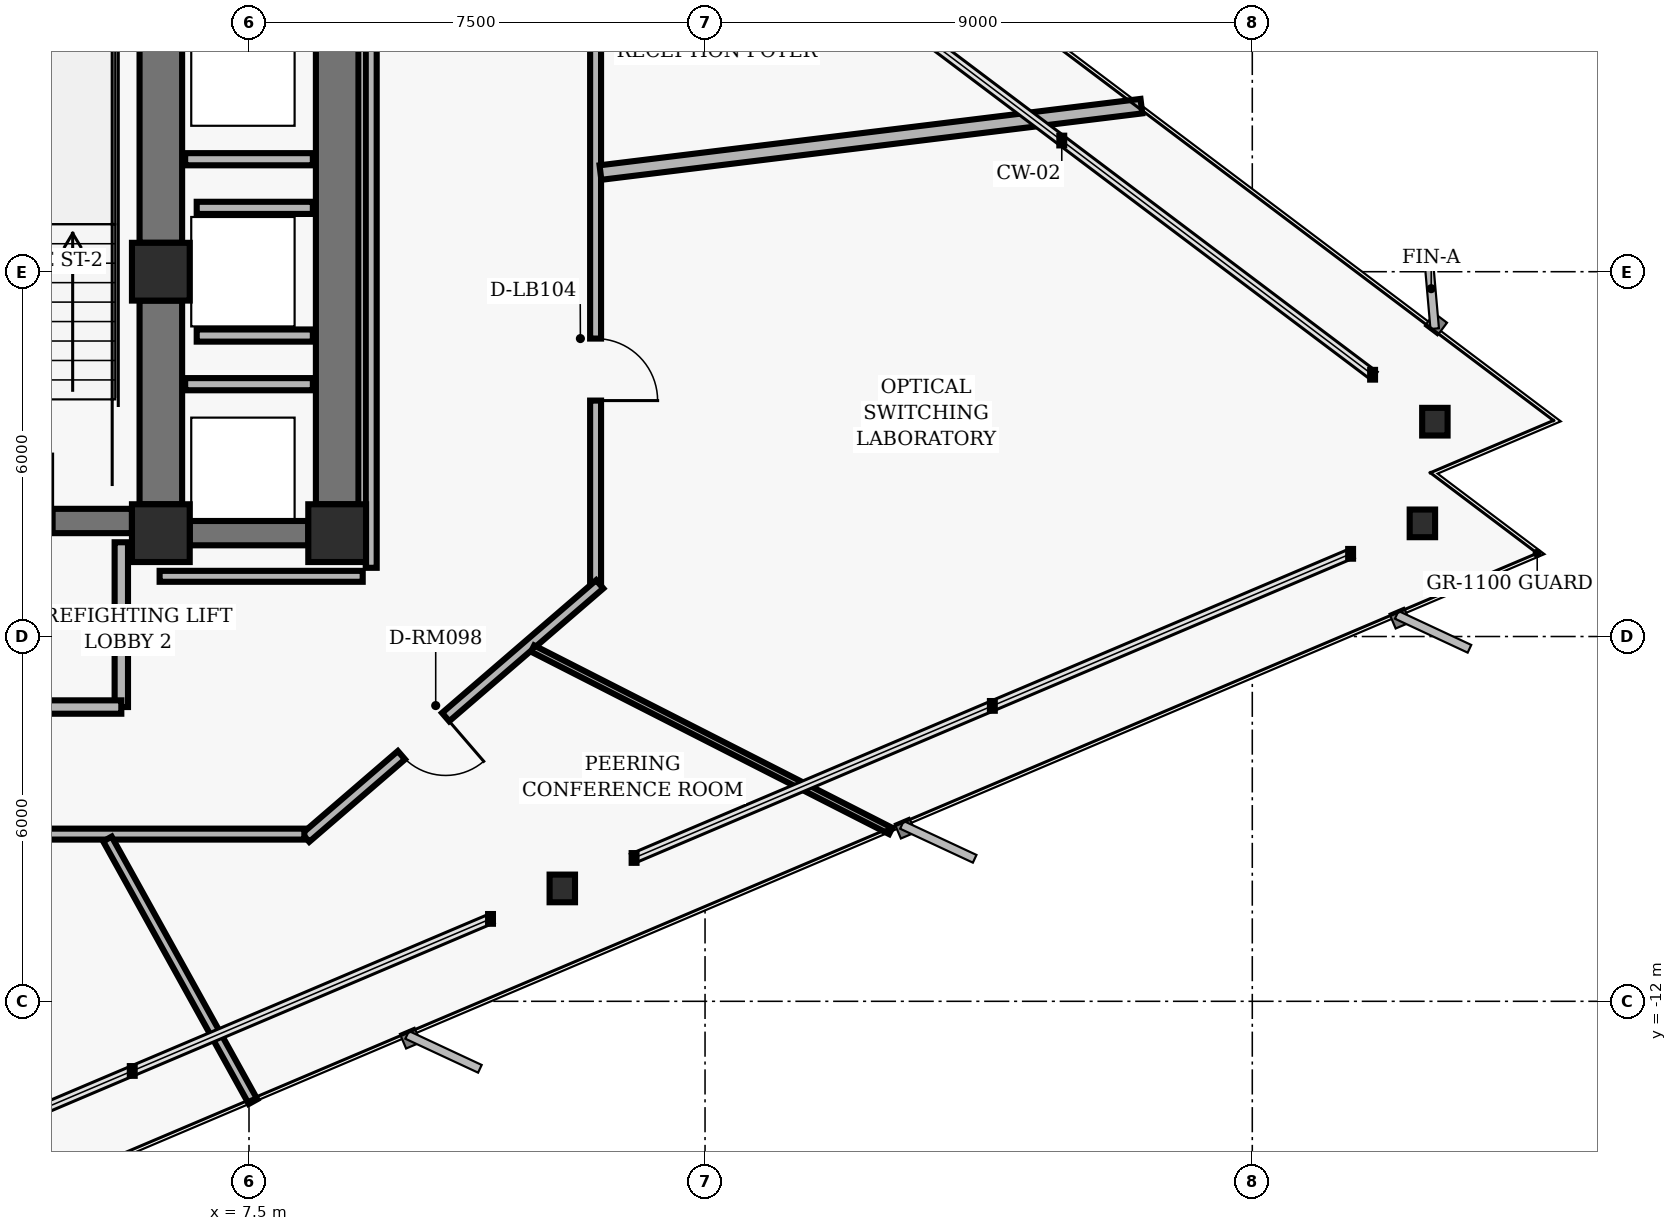
"""IFC4 building model, lengths in metres.
Left out: names, types, materials, properties, quantities, classifications, styles, units other than length and angle.
Written with IfcOpenShell. Run it as: python <this file> out.ifc"""

import sys

from ifc_helpers import new_model, si_unit, direction, frame, frame_2d, origin, origin_2d, place, context, subcontext, project, spatial, rectangle, hollow_rectangle, i_section, extrude, element, fill, save


model = new_model("IFC4")
c1 = context("Model", 3, precision=1e-05, world=origin(), true_north=direction((0.0, 1.0)))
c2 = subcontext(c1, "Body", "Model", "MODEL_VIEW")
j1 = project(units=[si_unit("LENGTHUNIT", "METRE"), si_unit("PLANEANGLEUNIT", "RADIAN")], contexts=[c1])
p1 = place(None, origin())
s1 = spatial("IfcSite", under=j1, at=p1, CompositionType="ELEMENT")
p2 = place(p1, origin())
s2 = spatial("IfcBuilding", under=s1, at=p2, CompositionType="ELEMENT")
p3 = place(p2, frame((0.0, 0.0, 66.4)))
s3 = spatial("IfcBuildingStorey", under=s2, at=p3, CompositionType="ELEMENT", Elevation=66.4)
for number, where, z_axis, x_axis in (
    (1, (6.05, 0.0, 0.0), (0.0, 0.0, 1.0), (1.0, 0.0, 0.0)),
    (2, (6.05, -4.3, 0.0), (0.0, 0.0, 1.0), (1.0, 0.0, 0.0)),
    (3, (8.95, -4.3, 0.0), (0.0, 0.0, 1.0), (1.0, 0.0, 0.0)),
):
    element("IfcColumn", number, at=place(p3, frame(where, z_axis=z_axis, x_axis=x_axis)), inside=s3, PredefinedType="COLUMN", context=c2, shape_type="SweptSolid", body=[
        extrude(hollow_rectangle(XDim=0.95, YDim=0.95, WallThickness=0.06, InnerFilletRadius=0.02, OuterFilletRadius=0.04, at=origin_2d()), origin(), (0.0, 0.0, 1.0), 3.36),
    ])
p4 = place(p3, frame((6.05, 0.475, 0.0), z_axis=(0.0, 0.0, 1.0), x_axis=(0.0, 1.0, 0.0)))
e4 = element("IfcWall", 4, at=p4, inside=s3, PredefinedType="SHEAR", context=c2, shape_type="SweptSolid", body=[
    extrude(rectangle(XDim=3.55, YDim=0.7, at=frame_2d((1.775, 0.0))), origin(), (0.0, 0.0, 1.0), 3.098),
])
p5 = place(p3, frame((6.05, -3.825, 0.0), z_axis=(0.0, 0.0, 1.0), x_axis=(0.0, 1.0, 0.0)))
e5 = element("IfcWall", 5, at=p5, inside=s3, PredefinedType="SHEAR", context=c2, shape_type="SweptSolid", body=[
    extrude(rectangle(XDim=3.35, YDim=0.7, at=frame_2d((1.675, 0.0))), origin(), (0.0, 0.0, 1.0), 3.098),
])
p6 = place(p3, frame((-5.575, -4.1, 0.0), z_axis=(0.0, 0.0, 1.0), x_axis=(1.0, 0.0, 0.0)))
e6 = element("IfcWall", 6, at=p6, inside=s3, PredefinedType="SHEAR", context=c2, shape_type="SweptSolid", body=[
    extrude(rectangle(XDim=11.15, YDim=0.4, at=frame_2d((5.575, 0.0))), origin(), (0.0, 0.0, 1.0), 3.098),
])
p7 = place(p6, frame((1.305, 0.0, 0.0)))
e7 = element("IfcOpeningElement", 7, at=p7, cuts=e6, PredefinedType="OPENING", context=c2, shape_type="SweptSolid", body=[
    extrude(rectangle(XDim=1.1, YDim=2.04, at=frame_2d((0.55, 1.02))), frame((0.0, 0.21, 0.0), z_axis=(0.0, -1.0, 0.0), x_axis=(1.0, 0.0, 0.0)), (0.0, 0.0, 1.0), 0.42),
])
p8 = place(p6, frame((8.745, 0.0, 0.0)))
e8 = element("IfcOpeningElement", 8, at=p8, cuts=e6, PredefinedType="OPENING", context=c2, shape_type="SweptSolid", body=[
    extrude(rectangle(XDim=1.1, YDim=2.04, at=frame_2d((0.55, 1.02))), frame((0.0, 0.21, 0.0), z_axis=(0.0, -1.0, 0.0), x_axis=(1.0, 0.0, 0.0)), (0.0, 0.0, 1.0), 0.42),
])
p9 = place(p6, frame((4.045, 0.0, 0.0)))
e9 = element("IfcOpeningElement", 9, at=p9, cuts=e6, PredefinedType="OPENING", context=c2, shape_type="SweptSolid", body=[
    extrude(rectangle(XDim=1.06, YDim=2.04, at=frame_2d((0.53, 1.02))), frame((0.0, 0.21, 0.0), z_axis=(0.0, -1.0, 0.0), x_axis=(1.0, 0.0, 0.0)), (0.0, 0.0, 1.0), 0.42),
])
p10 = place(p6, frame((6.045, 0.0, 0.0)))
e10 = element("IfcOpeningElement", 10, at=p10, cuts=e6, PredefinedType="OPENING", context=c2, shape_type="SweptSolid", body=[
    extrude(rectangle(XDim=1.06, YDim=2.04, at=frame_2d((0.53, 1.02))), frame((0.0, 0.21, 0.0), z_axis=(0.0, -1.0, 0.0), x_axis=(1.0, 0.0, 0.0)), (0.0, 0.0, 1.0), 0.42),
])
p11 = place(p3, frame((8.95, -3.825, 0.0), z_axis=(0.0, 0.0, 1.0), x_axis=(0.0, 1.0, 0.0)))
e11 = element("IfcWall", 11, at=p11, inside=s3, PredefinedType="SHEAR", context=c2, shape_type="SweptSolid", body=[
    extrude(rectangle(XDim=7.85, YDim=0.7, at=frame_2d((3.925, 0.0))), origin(), (0.0, 0.0, 1.0), 3.098),
])
p12 = place(p3, frame((6.525, -4.3, 0.0), z_axis=(0.0, 0.0, 1.0), x_axis=(1.0, 0.0, 0.0)))
e12 = element("IfcWall", 12, at=p12, inside=s3, PredefinedType="SHEAR", context=c2, shape_type="SweptSolid", body=[
    extrude(rectangle(XDim=1.95, YDim=0.4, at=frame_2d((0.975, 0.0))), origin(), (0.0, 0.0, 1.0), 3.098),
])
for number, where, z_axis, x_axis in (
    (13, (27.003, -2.467, 0.0), (0.0, 0.0, 1.0), (1.0, 0.0, 0.0)),
    (14, (12.653, -10.143, 0.0), (0.0, 0.0, 1.0), (1.0, 0.0, 0.0)),
    (15, (26.798, -4.139, 0.0), (0.0, 0.0, 1.0), (1.0, 0.0, 0.0)),
):
    element("IfcColumn", number, at=place(p3, frame(where, z_axis=z_axis, x_axis=x_axis)), inside=s3, PredefinedType="COLUMN", context=c2, shape_type="SweptSolid", body=[
        extrude(i_section(OverallWidth=0.418, OverallDepth=0.455, WebThickness=0.042, FlangeThickness=0.068, FilletRadius=0.025, at=origin_2d()), origin(), (0.0, 0.0, 1.0), 3.36),
    ])
p13 = place(p3, frame((5.4, -7.16, 0.0), z_axis=(0.0, 0.0, 1.0), x_axis=(0.0, 1.0, 0.0)))
e16 = element("IfcWall", 16, at=p13, inside=s3, PredefinedType="PARTITIONING", context=c2, shape_type="SweptSolid", body=[
    extrude(rectangle(XDim=2.71, YDim=0.22, at=frame_2d((1.355, 0.0))), origin(), (0.0, 0.0, 1.0), 3.073),
])
p14 = place(p3, frame((0.0, -7.16, 0.0), z_axis=(0.0, 0.0, 1.0), x_axis=(1.0, 0.0, 0.0)))
e17 = element("IfcWall", 17, at=p14, inside=s3, PredefinedType="PARTITIONING", context=c2, shape_type="SweptSolid", body=[
    extrude(rectangle(XDim=5.4, YDim=0.22, at=frame_2d((2.7, 0.0))), origin(), (0.0, 0.0, 1.0), 2.587),
])
p15 = place(p14, frame((2.05, 0.0, 0.0)))
e18 = element("IfcOpeningElement", 18, at=p15, cuts=e17, PredefinedType="OPENING", context=c2, shape_type="SweptSolid", body=[
    extrude(rectangle(XDim=1.12, YDim=2.02, at=frame_2d((0.56, 1.01))), frame((0.0, 0.12, 0.0), z_axis=(0.0, -1.0, 0.0), x_axis=(1.0, 0.0, 0.0)), (0.0, 0.0, 1.0), 0.24),
])
for number, where, z_axis, x_axis in (
    (19, (6.45, -1.85, 0.0), (0.0, 0.0, 1.0), (1.0, 0.0, 0.0)),
    (20, (6.45, 1.85, 0.0), (0.0, 0.0, 1.0), (1.0, 0.0, 0.0)),
):
    element("IfcWall", number, at=place(p3, frame(where, z_axis=z_axis, x_axis=x_axis)), inside=s3, PredefinedType="PARTITIONING", context=c2, shape_type="SweptSolid", body=[
        extrude(rectangle(XDim=2.1, YDim=0.2, at=frame_2d((1.05, 0.0))), origin(), (0.0, 0.0, 1.0), 3.073),
    ])
for number, where, z_axis, x_axis in (
    (21, (6.64, -1.05, 0.0), (0.0, 0.0, 1.0), (1.0, 0.0, 0.0)),
    (22, (6.64, 1.05, 0.0), (0.0, 0.0, 1.0), (1.0, 0.0, 0.0)),
):
    element("IfcWall", number, at=place(p3, frame(where, z_axis=z_axis, x_axis=x_axis)), inside=s3, PredefinedType="PARTITIONING", context=c2, shape_type="SweptSolid", body=[
        extrude(rectangle(XDim=1.91, YDim=0.2, at=frame_2d((0.955, 0.0))), origin(), (0.0, 0.0, 1.0), 3.073),
    ])
p16 = place(p3, frame((13.2, 5.11, 0.0), z_axis=(0.0, 0.0, 1.0), x_axis=(0.0, -1.0, 0.0)))
e23 = element("IfcWall", 23, at=p16, inside=s3, PredefinedType="PARTITIONING", context=c2, shape_type="SweptSolid", body=[
    extrude(rectangle(XDim=10.22, YDim=0.18, at=frame_2d((5.11, 0.0))), origin(), (0.0, 0.0, 1.0), 3.073),
])
p17 = place(p16, frame((6.21, 0.0, 0.0)))
e24 = element("IfcOpeningElement", 24, at=p17, cuts=e23, PredefinedType="OPENING", context=c2, shape_type="SweptSolid", body=[
    extrude(rectangle(XDim=1.02, YDim=2.02, at=frame_2d((0.51, 1.01))), frame((0.0, 0.1, 0.0), z_axis=(0.0, -1.0, 0.0), x_axis=(1.0, 0.0, 0.0)), (0.0, 0.0, 1.0), 0.2),
])
p18 = place(p3, frame((13.268, -5.141, 0.0), z_axis=(0.0, 0.0, 1.0), x_axis=(-0.757534501725, -0.65279512766, 0.0)))
e25 = element("IfcWall", 25, at=p18, inside=s3, PredefinedType="PARTITIONING", context=c2, shape_type="SweptSolid", body=[
    extrude(rectangle(XDim=6.385, YDim=0.18, at=frame_2d((3.192, 0.0))), origin(), (0.0, 0.0, 1.0), 3.073),
])
p19 = place(p18, frame((3.346, 0.0, 0.0)))
e26 = element("IfcOpeningElement", 26, at=p19, cuts=e25, PredefinedType="OPENING", context=c2, shape_type="SweptSolid", body=[
    extrude(rectangle(XDim=0.96, YDim=2.02, at=frame_2d((0.48, 1.01))), frame((0.0, 0.1, 0.0), z_axis=(0.0, -1.0, 0.0), x_axis=(1.0, 0.0, 0.0)), (0.0, 0.0, 1.0), 0.2),
])
p20 = place(p3, frame((8.41, -9.25, 0.0), z_axis=(0.0, 0.0, 1.0), x_axis=(-1.0, 0.0, 0.0)))
e27 = element("IfcWall", 27, at=p20, inside=s3, PredefinedType="PARTITIONING", context=c2, shape_type="SweptSolid", body=[
    extrude(rectangle(XDim=17.0, YDim=0.18, at=frame_2d((8.5, 0.0))), origin(), (0.0, 0.0, 1.0), 2.587),
])
p21 = place(p20, frame((12.127, 0.0, 0.0)))
e28 = element("IfcOpeningElement", 28, at=p21, cuts=e27, PredefinedType="OPENING", context=c2, shape_type="SweptSolid", body=[
    extrude(rectangle(XDim=0.96, YDim=2.02, at=frame_2d((0.48, 1.01))), frame((0.0, 0.1, 0.0), z_axis=(0.0, -1.0, 0.0), x_axis=(1.0, 0.0, 0.0)), (0.0, 0.0, 1.0), 0.2),
])
p22 = place(p20, frame((5.75, 0.0, 0.0)))
e29 = element("IfcOpeningElement", 29, at=p22, cuts=e27, PredefinedType="OPENING", context=c2, shape_type="SweptSolid", body=[
    extrude(rectangle(XDim=0.96, YDim=2.02, at=frame_2d((0.48, 1.01))), frame((0.0, 0.1, 0.0), z_axis=(0.0, -1.0, 0.0), x_axis=(1.0, 0.0, 0.0)), (0.0, 0.0, 1.0), 0.2),
])
p23 = place(p3, frame((6.03, -5.01, 0.0), z_axis=(0.0, 0.0, 1.0), x_axis=(1.0, 0.0, 0.0)))
e30 = element("IfcWall", 30, at=p23, inside=s3, PredefinedType="PARTITIONING", context=c2, shape_type="SweptSolid", body=[
    extrude(rectangle(XDim=3.34, YDim=0.18, at=frame_2d((1.67, 0.0))), origin(), (0.0, 0.0, 1.0), 3.073),
])
p24 = place(p3, frame((9.51, -4.87, 0.0), z_axis=(0.0, 0.0, 1.0), x_axis=(0.0, 1.0, 0.0)))
e31 = element("IfcWall", 31, at=p24, inside=s3, PredefinedType="PARTITIONING", context=c2, shape_type="SweptSolid", body=[
    extrude(rectangle(XDim=9.74, YDim=0.18, at=frame_2d((4.87, 0.0))), origin(), (0.0, 0.0, 1.0), 3.073),
])
p25 = place(p3, frame((5.172, -9.33, 0.0), z_axis=(0.0, 0.0, 1.0), x_axis=(0.484815832005, -0.874616263876, 0.0)))
e32 = element("IfcWall", 32, at=p25, inside=s3, PredefinedType="PARTITIONING", context=c2, shape_type="SweptSolid", body=[
    extrude(rectangle(XDim=4.938, YDim=0.16, at=frame_2d((2.469, 0.0))), origin(), (0.0, 0.0, 1.0), 3.073),
])
p26 = place(p3, frame((12.164, -6.198, 0.0), z_axis=(0.0, 0.0, 1.0), x_axis=(0.891002560884, -0.453998278079, 0.0)))
e33 = element("IfcWall", 33, at=p26, inside=s3, PredefinedType="MOVABLE", context=c2, shape_type="SweptSolid", body=[
    extrude(rectangle(XDim=6.608, YDim=0.115, at=frame_2d((3.304, 0.0))), origin(), (0.0, 0.0, 1.0), 3.073),
])
p27 = place(p3, frame((13.28, 1.631, 0.0), z_axis=(0.0, 0.0, 1.0), x_axis=(0.992547039209, 0.121862114529, 0.0)))
e34 = element("IfcWall", 34, at=p27, inside=s3, PredefinedType="PARTITIONING", context=c2, shape_type="SweptSolid", body=[
    extrude(rectangle(XDim=8.963, YDim=0.24, at=frame_2d((4.482, 0.0))), origin(), (0.0, 0.0, 1.0), 3.073),
])
p28 = place(p8, origin())
e35 = element("IfcDoor", 35, at=p28, inside=s3, OperationType="SINGLE_SWING_RIGHT", PredefinedType="DOOR", context=c2, shape_type="SweptSolid", body=[
    extrude(rectangle(XDim=1.1, YDim=2.04, at=frame_2d((0.55, 1.02))), frame((0.0, 0.025, 0.0), z_axis=(0.0, -1.0, 0.0), x_axis=(1.0, 0.0, 0.0)), (0.0, 0.0, 1.0), 0.05),
])
fill(e8, e35)
p29 = place(p19, origin())
e36 = element("IfcDoor", 36, at=p29, inside=s3, OperationType="SINGLE_SWING_LEFT", PredefinedType="DOOR", context=c2, shape_type="SweptSolid", body=[
    extrude(rectangle(XDim=0.96, YDim=2.02, at=frame_2d((0.48, 1.01))), frame((0.0, 0.025, 0.0), z_axis=(0.0, -1.0, 0.0), x_axis=(1.0, 0.0, 0.0)), (0.0, 0.0, 1.0), 0.05),
])
fill(e26, e36)
p30 = place(p17, origin())
e37 = element("IfcDoor", 37, at=p30, inside=s3, OperationType="SINGLE_SWING_RIGHT", PredefinedType="DOOR", context=c2, shape_type="SweptSolid", body=[
    extrude(rectangle(XDim=1.02, YDim=2.02, at=frame_2d((0.51, 1.01))), frame((0.0, 0.025, 0.0), z_axis=(0.0, -1.0, 0.0), x_axis=(1.0, 0.0, 0.0)), (0.0, 0.0, 1.0), 0.05),
])
fill(e24, e37)
save(model, sys.argv[1])
